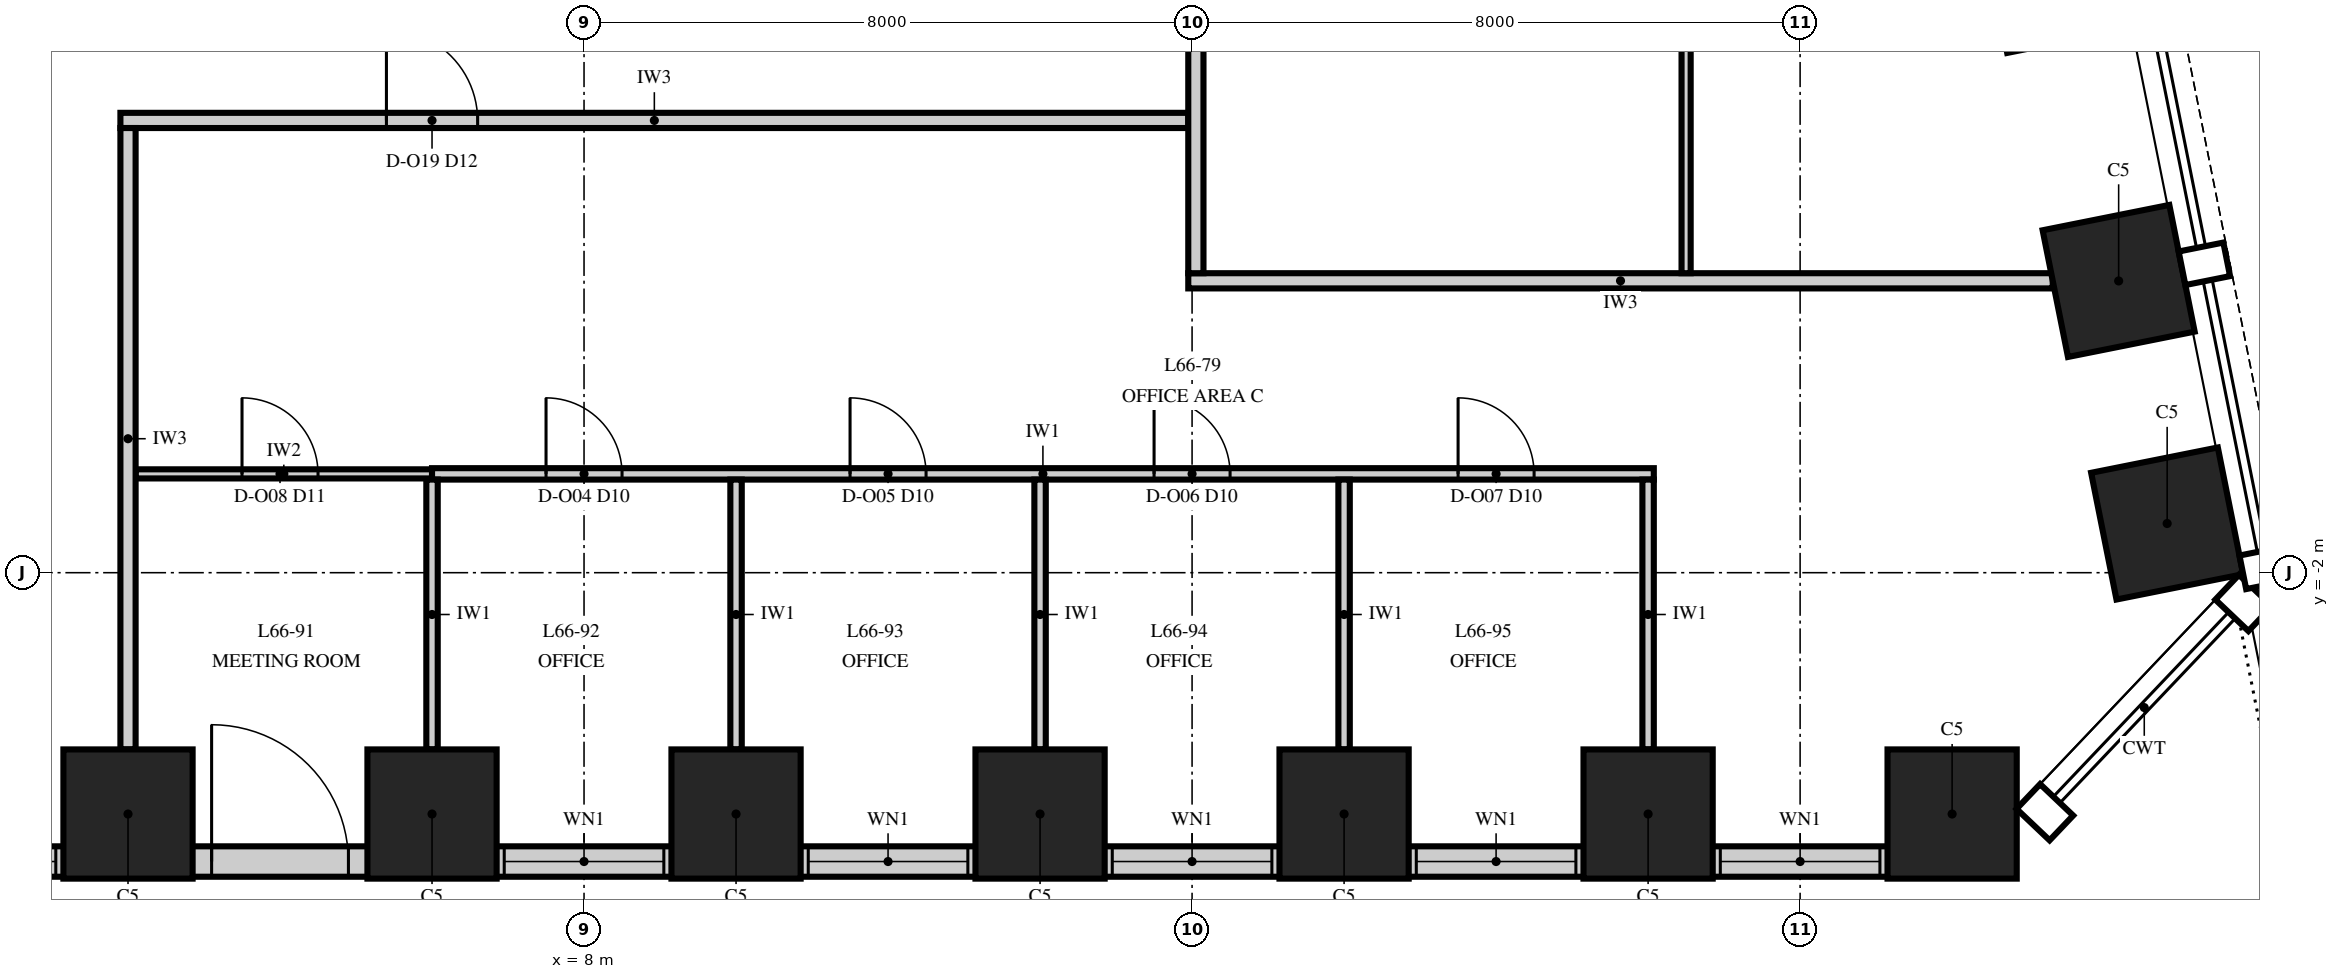
"""IFC4 building model, lengths in metres.
Left out: names, types, materials, properties, quantities, classifications, styles, units other than length and angle.
Written with IfcOpenShell. Run it as: python <this file> out.ifc"""

import sys

from ifc_helpers import new_model, si_unit, direction, frame, frame_2d, origin, origin_2d, place, context, subcontext, project, spatial, rectangle, extrude, element, fill, save


model = new_model("IFC4")
c1 = context("Model", 3, precision=1e-05, world=origin(), true_north=direction((0.0, 1.0)))
c2 = subcontext(c1, "Body", "Model", "MODEL_VIEW")
j1 = project(units=[si_unit("LENGTHUNIT", "METRE"), si_unit("PLANEANGLEUNIT", "RADIAN")], contexts=[c1])
p1 = place(None, origin())
s1 = spatial("IfcSite", under=j1, at=p1, CompositionType="ELEMENT")
p2 = place(p1, origin())
s2 = spatial("IfcBuilding", under=s1, at=p2, CompositionType="ELEMENT")
p3 = place(p2, frame((0.0, 0.0, 284.0)))
s3 = spatial("IfcBuildingStorey", under=s2, at=p3, CompositionType="ELEMENT", Elevation=284.0)
for number, where, z_axis, x_axis in (
    (1, (2.0, -5.175, 0.0), (0.0, 0.0, 1.0), (1.0, 0.0, 0.0)),
    (2, (6.0, -5.175, 0.0), (0.0, 0.0, 1.0), (1.0, 0.0, 0.0)),
    (3, (10.0, -5.175, 0.0), (0.0, 0.0, 1.0), (1.0, 0.0, 0.0)),
    (4, (14.0, -5.175, 0.0), (0.0, 0.0, 1.0), (1.0, 0.0, 0.0)),
    (5, (18.0, -5.175, 0.0), (0.0, 0.0, 1.0), (1.0, 0.0, 0.0)),
    (6, (22.0, -5.175, 0.0), (0.0, 0.0, 1.0), (1.0, 0.0, 0.0)),
    (7, (26.0, -5.175, 0.0), (0.0, 0.0, 1.0), (1.0, 0.0, 0.0)),
    (8, (28.829, -1.353, 0.0), (0.0, 0.0, 1.0), (-0.196, 0.981, 0.0)),
    (9, (28.191, 1.838, 0.0), (0.0, 0.0, 1.0), (-0.196, 0.981, 0.0)),
    (10, (27.391, 5.838, 0.0), (0.0, 0.0, 1.0), (-0.196, 0.981, 0.0)),
):
    element("IfcColumn", number, at=place(p3, frame(where, z_axis=z_axis, x_axis=x_axis)), inside=s3, PredefinedType="COLUMN", context=c2, shape_type="SweptSolid", body=[
        extrude(rectangle(XDim=1.7, YDim=1.7, at=origin_2d()), origin(), (0.0, 0.0, 1.0), 4.0),
    ])
p4 = place(p3, frame((-26.0, -5.8, 0.0), z_axis=(0.0, 0.0, 1.0), x_axis=(1.0, 0.0, 0.0)))
e11 = element("IfcWall", 11, at=p4, inside=s3, PredefinedType="SOLIDWALL", context=c2, shape_type="SweptSolid", body=[
    extrude(rectangle(XDim=52.0, YDim=0.4, at=frame_2d((26.0, 0.0))), origin(), (0.0, 0.0, 1.0), 2.0),
])
p5 = place(p4, frame((0.95, 0.0, 0.8)))
e12 = element("IfcOpeningElement", 12, at=p5, cuts=e11, PredefinedType="OPENING", context=c2, shape_type="SweptSolid", body=[
    extrude(rectangle(XDim=2.1, YDim=1.15, at=frame_2d((1.05, 0.575))), frame((0.0, 0.215, 0.0), z_axis=(0.0, -1.0, 0.0), x_axis=(1.0, 0.0, 0.0)), (0.0, 0.0, 1.0), 0.43),
])
p6 = place(p4, frame((4.95, 0.0, 0.8)))
e13 = element("IfcOpeningElement", 13, at=p6, cuts=e11, PredefinedType="OPENING", context=c2, shape_type="SweptSolid", body=[
    extrude(rectangle(XDim=2.1, YDim=1.15, at=frame_2d((1.05, 0.575))), frame((0.0, 0.215, 0.0), z_axis=(0.0, -1.0, 0.0), x_axis=(1.0, 0.0, 0.0)), (0.0, 0.0, 1.0), 0.43),
])
p7 = place(p4, frame((8.95, 0.0, 0.8)))
e14 = element("IfcOpeningElement", 14, at=p7, cuts=e11, PredefinedType="OPENING", context=c2, shape_type="SweptSolid", body=[
    extrude(rectangle(XDim=2.1, YDim=1.15, at=frame_2d((1.05, 0.575))), frame((0.0, 0.215, 0.0), z_axis=(0.0, -1.0, 0.0), x_axis=(1.0, 0.0, 0.0)), (0.0, 0.0, 1.0), 0.43),
])
p8 = place(p4, frame((12.95, 0.0, 0.8)))
e15 = element("IfcOpeningElement", 15, at=p8, cuts=e11, PredefinedType="OPENING", context=c2, shape_type="SweptSolid", body=[
    extrude(rectangle(XDim=2.1, YDim=1.15, at=frame_2d((1.05, 0.575))), frame((0.0, 0.215, 0.0), z_axis=(0.0, -1.0, 0.0), x_axis=(1.0, 0.0, 0.0)), (0.0, 0.0, 1.0), 0.43),
])
p9 = place(p4, frame((16.95, 0.0, 0.8)))
e16 = element("IfcOpeningElement", 16, at=p9, cuts=e11, PredefinedType="OPENING", context=c2, shape_type="SweptSolid", body=[
    extrude(rectangle(XDim=2.1, YDim=1.15, at=frame_2d((1.05, 0.575))), frame((0.0, 0.215, 0.0), z_axis=(0.0, -1.0, 0.0), x_axis=(1.0, 0.0, 0.0)), (0.0, 0.0, 1.0), 0.43),
])
p10 = place(p4, frame((21.1, 0.0, 0.0)))
e17 = element("IfcOpeningElement", 17, at=p10, cuts=e11, PredefinedType="OPENING", context=c2, shape_type="SweptSolid", body=[
    extrude(rectangle(XDim=1.8, YDim=2.0, at=frame_2d((0.9, 1.0))), frame((0.0, 0.215, 0.0), z_axis=(0.0, -1.0, 0.0), x_axis=(1.0, 0.0, 0.0)), (0.0, 0.0, 1.0), 0.43),
])
p11 = place(p4, frame((24.95, 0.0, 0.8)))
e18 = element("IfcOpeningElement", 18, at=p11, cuts=e11, PredefinedType="OPENING", context=c2, shape_type="SweptSolid", body=[
    extrude(rectangle(XDim=2.1, YDim=1.15, at=frame_2d((1.05, 0.575))), frame((0.0, 0.215, 0.0), z_axis=(0.0, -1.0, 0.0), x_axis=(1.0, 0.0, 0.0)), (0.0, 0.0, 1.0), 0.43),
])
p12 = place(p4, frame((29.1, 0.0, 0.0)))
e19 = element("IfcOpeningElement", 19, at=p12, cuts=e11, PredefinedType="OPENING", context=c2, shape_type="SweptSolid", body=[
    extrude(rectangle(XDim=1.8, YDim=2.0, at=frame_2d((0.9, 1.0))), frame((0.0, 0.215, 0.0), z_axis=(0.0, -1.0, 0.0), x_axis=(1.0, 0.0, 0.0)), (0.0, 0.0, 1.0), 0.43),
])
p13 = place(p4, frame((32.95, 0.0, 0.8)))
e20 = element("IfcOpeningElement", 20, at=p13, cuts=e11, PredefinedType="OPENING", context=c2, shape_type="SweptSolid", body=[
    extrude(rectangle(XDim=2.1, YDim=1.15, at=frame_2d((1.05, 0.575))), frame((0.0, 0.215, 0.0), z_axis=(0.0, -1.0, 0.0), x_axis=(1.0, 0.0, 0.0)), (0.0, 0.0, 1.0), 0.43),
])
p14 = place(p4, frame((36.95, 0.0, 0.8)))
e21 = element("IfcOpeningElement", 21, at=p14, cuts=e11, PredefinedType="OPENING", context=c2, shape_type="SweptSolid", body=[
    extrude(rectangle(XDim=2.1, YDim=1.15, at=frame_2d((1.05, 0.575))), frame((0.0, 0.215, 0.0), z_axis=(0.0, -1.0, 0.0), x_axis=(1.0, 0.0, 0.0)), (0.0, 0.0, 1.0), 0.43),
])
p15 = place(p4, frame((40.95, 0.0, 0.8)))
e22 = element("IfcOpeningElement", 22, at=p15, cuts=e11, PredefinedType="OPENING", context=c2, shape_type="SweptSolid", body=[
    extrude(rectangle(XDim=2.1, YDim=1.15, at=frame_2d((1.05, 0.575))), frame((0.0, 0.215, 0.0), z_axis=(0.0, -1.0, 0.0), x_axis=(1.0, 0.0, 0.0)), (0.0, 0.0, 1.0), 0.43),
])
p16 = place(p4, frame((44.95, 0.0, 0.8)))
e23 = element("IfcOpeningElement", 23, at=p16, cuts=e11, PredefinedType="OPENING", context=c2, shape_type="SweptSolid", body=[
    extrude(rectangle(XDim=2.1, YDim=1.15, at=frame_2d((1.05, 0.575))), frame((0.0, 0.215, 0.0), z_axis=(0.0, -1.0, 0.0), x_axis=(1.0, 0.0, 0.0)), (0.0, 0.0, 1.0), 0.43),
])
p17 = place(p4, frame((48.95, 0.0, 0.8)))
e24 = element("IfcOpeningElement", 24, at=p17, cuts=e11, PredefinedType="OPENING", context=c2, shape_type="SweptSolid", body=[
    extrude(rectangle(XDim=2.1, YDim=1.15, at=frame_2d((1.05, 0.575))), frame((0.0, 0.215, 0.0), z_axis=(0.0, -1.0, 0.0), x_axis=(1.0, 0.0, 0.0)), (0.0, 0.0, 1.0), 0.43),
])
p18 = place(p3, frame((2.1, -0.7, 0.0), z_axis=(0.0, 0.0, 1.0), x_axis=(1.0, 0.0, 0.0)))
e25 = element("IfcWall", 25, at=p18, inside=s3, PredefinedType="PARTITIONING", context=c2, shape_type="SweptSolid", body=[
    extrude(rectangle(XDim=3.9, YDim=0.12, at=frame_2d((1.95, 0.0))), origin(), (0.0, 0.0, 1.0), 3.23),
])
p19 = place(p18, frame((1.4, 0.0, 0.0)))
e26 = element("IfcOpeningElement", 26, at=p19, cuts=e25, PredefinedType="OPENING", context=c2, shape_type="SweptSolid", body=[
    extrude(rectangle(XDim=1.0, YDim=2.4, at=frame_2d((0.5, 1.2))), frame((0.0, 0.075, 0.0), z_axis=(0.0, -1.0, 0.0), x_axis=(1.0, 0.0, 0.0)), (0.0, 0.0, 1.0), 0.15),
])
p20 = place(p3, frame((6.0, -0.7, 0.0), z_axis=(0.0, 0.0, 1.0), x_axis=(1.0, 0.0, 0.0)))
e27 = element("IfcWall", 27, at=p20, inside=s3, PredefinedType="PARTITIONING", context=c2, shape_type="SweptSolid", body=[
    extrude(rectangle(XDim=16.075, YDim=0.15, at=frame_2d((8.038, 0.0))), origin(), (0.0, 0.0, 1.0), 3.23),
])
p21 = place(p20, frame((1.5, 0.0, 0.0)))
e28 = element("IfcOpeningElement", 28, at=p21, cuts=e27, PredefinedType="OPENING", context=c2, shape_type="SweptSolid", body=[
    extrude(rectangle(XDim=1.0, YDim=2.3, at=frame_2d((0.5, 1.15))), frame((0.0, 0.09, 0.0), z_axis=(0.0, -1.0, 0.0), x_axis=(1.0, 0.0, 0.0)), (0.0, 0.0, 1.0), 0.18),
])
p22 = place(p20, frame((5.5, 0.0, 0.0)))
e29 = element("IfcOpeningElement", 29, at=p22, cuts=e27, PredefinedType="OPENING", context=c2, shape_type="SweptSolid", body=[
    extrude(rectangle(XDim=1.0, YDim=2.3, at=frame_2d((0.5, 1.15))), frame((0.0, 0.09, 0.0), z_axis=(0.0, -1.0, 0.0), x_axis=(1.0, 0.0, 0.0)), (0.0, 0.0, 1.0), 0.18),
])
p23 = place(p20, frame((9.5, 0.0, 0.0)))
e30 = element("IfcOpeningElement", 30, at=p23, cuts=e27, PredefinedType="OPENING", context=c2, shape_type="SweptSolid", body=[
    extrude(rectangle(XDim=1.0, YDim=2.3, at=frame_2d((0.5, 1.15))), frame((0.0, 0.09, 0.0), z_axis=(0.0, -1.0, 0.0), x_axis=(1.0, 0.0, 0.0)), (0.0, 0.0, 1.0), 0.18),
])
p24 = place(p20, frame((13.5, 0.0, 0.0)))
e31 = element("IfcOpeningElement", 31, at=p24, cuts=e27, PredefinedType="OPENING", context=c2, shape_type="SweptSolid", body=[
    extrude(rectangle(XDim=1.0, YDim=2.3, at=frame_2d((0.5, 1.15))), frame((0.0, 0.09, 0.0), z_axis=(0.0, -1.0, 0.0), x_axis=(1.0, 0.0, 0.0)), (0.0, 0.0, 1.0), 0.18),
])
p25 = place(p3, frame((15.95, 1.84, 0.0), z_axis=(0.0, 0.0, 1.0), x_axis=(1.0, 0.0, 0.0)))
e32 = element("IfcWall", 32, at=p25, inside=s3, PredefinedType="PARTITIONING", context=c2, shape_type="SweptSolid", body=[
    extrude(rectangle(XDim=11.374, YDim=0.2, at=frame_2d((5.687, 0.0))), origin(), (0.0, 0.0, 1.0), 3.23),
])
p26 = place(p3, frame((1.9, 3.95, 0.0), z_axis=(0.0, 0.0, 1.0), x_axis=(1.0, 0.0, 0.0)))
e33 = element("IfcWall", 33, at=p26, inside=s3, PredefinedType="PARTITIONING", context=c2, shape_type="SweptSolid", body=[
    extrude(rectangle(XDim=14.05, YDim=0.2, at=frame_2d((7.025, 0.0))), origin(), (0.0, 0.0, 1.0), 3.23),
])
p27 = place(p26, frame((3.5, 0.0, 0.0)))
e34 = element("IfcOpeningElement", 34, at=p27, cuts=e33, PredefinedType="OPENING", context=c2, shape_type="SweptSolid", body=[
    extrude(rectangle(XDim=1.2, YDim=2.4, at=frame_2d((0.6, 1.2))), frame((0.0, 0.115, 0.0), z_axis=(0.0, -1.0, 0.0), x_axis=(1.0, 0.0, 0.0)), (0.0, 0.0, 1.0), 0.23),
])
p28 = place(p3, frame((2.0, -4.325, 0.0), z_axis=(0.0, 0.0, 1.0), x_axis=(0.0, 1.0, 0.0)))
e35 = element("IfcWall", 35, at=p28, inside=s3, PredefinedType="PARTITIONING", context=c2, shape_type="SweptSolid", body=[
    extrude(rectangle(XDim=8.175, YDim=0.2, at=frame_2d((4.087, 0.0))), origin(), (0.0, 0.0, 1.0), 3.23),
])
for number, where, z_axis, x_axis in (
    (36, (6.0, -4.325, 0.0), (0.0, 0.0, 1.0), (0.0, 1.0, 0.0)),
    (37, (10.0, -4.325, 0.0), (0.0, 0.0, 1.0), (0.0, 1.0, 0.0)),
    (38, (14.0, -4.325, 0.0), (0.0, 0.0, 1.0), (0.0, 1.0, 0.0)),
):
    element("IfcWall", number, at=place(p3, frame(where, z_axis=z_axis, x_axis=x_axis)), inside=s3, PredefinedType="PARTITIONING", context=c2, shape_type="SweptSolid", body=[
        extrude(rectangle(XDim=3.55, YDim=0.15, at=frame_2d((1.775, 0.0))), origin(), (0.0, 0.0, 1.0), 3.23),
    ])
p29 = place(p3, frame((16.05, 1.94, 0.0), z_axis=(0.0, 0.0, 1.0), x_axis=(0.0, 1.0, 0.0)))
e39 = element("IfcWall", 39, at=p29, inside=s3, PredefinedType="PARTITIONING", context=c2, shape_type="SweptSolid", body=[
    extrude(rectangle(XDim=24.01, YDim=0.2, at=frame_2d((12.005, 0.0))), origin(), (0.0, 0.0, 1.0), 2.842),
])
p30 = place(p29, frame((8.46, 0.0, 0.0)))
e40 = element("IfcOpeningElement", 40, at=p30, cuts=e39, PredefinedType="OPENING", context=c2, shape_type="SweptSolid", body=[
    extrude(rectangle(XDim=1.2, YDim=2.4, at=frame_2d((0.6, 1.2))), frame((0.0, 0.115, 0.0), z_axis=(0.0, -1.0, 0.0), x_axis=(1.0, 0.0, 0.0)), (0.0, 0.0, 1.0), 0.23),
])
p31 = place(p29, frame((22.46, 0.0, 0.0)))
e41 = element("IfcOpeningElement", 41, at=p31, cuts=e39, PredefinedType="OPENING", context=c2, shape_type="SweptSolid", body=[
    extrude(rectangle(XDim=1.2, YDim=2.4, at=frame_2d((0.6, 1.2))), frame((0.0, 0.115, 0.0), z_axis=(0.0, -1.0, 0.0), x_axis=(1.0, 0.0, 0.0)), (0.0, 0.0, 1.0), 0.23),
])
for number, where, z_axis, x_axis in (
    (42, (18.0, -4.325, 0.0), (0.0, 0.0, 1.0), (0.0, 1.0, 0.0)),
    (43, (22.0, -4.325, 0.0), (0.0, 0.0, 1.0), (0.0, 1.0, 0.0)),
):
    element("IfcWall", number, at=place(p3, frame(where, z_axis=z_axis, x_axis=x_axis)), inside=s3, PredefinedType="PARTITIONING", context=c2, shape_type="SweptSolid", body=[
        extrude(rectangle(XDim=3.55, YDim=0.15, at=frame_2d((1.775, 0.0))), origin(), (0.0, 0.0, 1.0), 3.23),
    ])
p32 = place(p3, frame((22.5, 1.94, 0.0), z_axis=(0.0, 0.0, 1.0), x_axis=(0.0, 1.0, 0.0)))
e44 = element("IfcWall", 44, at=p32, inside=s3, PredefinedType="PARTITIONING", context=c2, shape_type="SweptSolid", body=[
    extrude(rectangle(XDim=7.825, YDim=0.12, at=frame_2d((3.913, 0.0))), origin(), (0.0, 0.0, 1.0), 2.842),
])
p33 = place(p32, frame((3.4, 0.0, 0.0)))
e45 = element("IfcOpeningElement", 45, at=p33, cuts=e44, PredefinedType="OPENING", context=c2, shape_type="SweptSolid", body=[
    extrude(rectangle(XDim=1.0, YDim=2.4, at=frame_2d((0.5, 1.2))), frame((0.0, 0.075, 0.0), z_axis=(0.0, -1.0, 0.0), x_axis=(1.0, 0.0, 0.0)), (0.0, 0.0, 1.0), 0.15),
])
p34 = place(p11, origin())
e46 = element("IfcWindow", 46, at=p34, inside=s3, PartitioningType="SINGLE_PANEL", PredefinedType="WINDOW", context=c2, shape_type="SweptSolid", body=[
    extrude(rectangle(XDim=2.1, YDim=1.15, at=frame_2d((1.05, 0.575))), frame((0.0, 0.03, 0.0), z_axis=(0.0, -1.0, 0.0), x_axis=(1.0, 0.0, 0.0)), (0.0, 0.0, 1.0), 0.06),
])
fill(e18, e46)
p35 = place(p12, origin())
e47 = element("IfcDoor", 47, at=p35, inside=s3, OperationType="DOUBLE_DOOR_SINGLE_SWING", PredefinedType="DOOR", context=c2, shape_type="SweptSolid", body=[
    extrude(rectangle(XDim=1.8, YDim=2.0, at=frame_2d((0.9, 1.0))), frame((0.0, 0.2, 0.0), z_axis=(0.0, -1.0, 0.0), x_axis=(1.0, 0.0, 0.0)), (0.0, 0.0, 1.0), 0.399),
])
fill(e19, e47)
p36 = place(p13, origin())
e48 = element("IfcWindow", 48, at=p36, inside=s3, PartitioningType="SINGLE_PANEL", PredefinedType="WINDOW", context=c2, shape_type="SweptSolid", body=[
    extrude(rectangle(XDim=2.1, YDim=1.15, at=frame_2d((1.05, 0.575))), frame((0.0, 0.03, 0.0), z_axis=(0.0, -1.0, 0.0), x_axis=(1.0, 0.0, 0.0)), (0.0, 0.0, 1.0), 0.06),
])
fill(e20, e48)
p37 = place(p14, origin())
e49 = element("IfcWindow", 49, at=p37, inside=s3, PartitioningType="SINGLE_PANEL", PredefinedType="WINDOW", context=c2, shape_type="SweptSolid", body=[
    extrude(rectangle(XDim=2.1, YDim=1.15, at=frame_2d((1.05, 0.575))), frame((0.0, 0.03, 0.0), z_axis=(0.0, -1.0, 0.0), x_axis=(1.0, 0.0, 0.0)), (0.0, 0.0, 1.0), 0.06),
])
fill(e21, e49)
p38 = place(p15, origin())
e50 = element("IfcWindow", 50, at=p38, inside=s3, PartitioningType="SINGLE_PANEL", PredefinedType="WINDOW", context=c2, shape_type="SweptSolid", body=[
    extrude(rectangle(XDim=2.1, YDim=1.15, at=frame_2d((1.05, 0.575))), frame((0.0, 0.03, 0.0), z_axis=(0.0, -1.0, 0.0), x_axis=(1.0, 0.0, 0.0)), (0.0, 0.0, 1.0), 0.06),
])
fill(e22, e50)
p39 = place(p16, origin())
e51 = element("IfcWindow", 51, at=p39, inside=s3, PartitioningType="SINGLE_PANEL", PredefinedType="WINDOW", context=c2, shape_type="SweptSolid", body=[
    extrude(rectangle(XDim=2.1, YDim=1.15, at=frame_2d((1.05, 0.575))), frame((0.0, 0.03, 0.0), z_axis=(0.0, -1.0, 0.0), x_axis=(1.0, 0.0, 0.0)), (0.0, 0.0, 1.0), 0.06),
])
fill(e23, e51)
p40 = place(p17, origin())
e52 = element("IfcWindow", 52, at=p40, inside=s3, PartitioningType="SINGLE_PANEL", PredefinedType="WINDOW", context=c2, shape_type="SweptSolid", body=[
    extrude(rectangle(XDim=2.1, YDim=1.15, at=frame_2d((1.05, 0.575))), frame((0.0, 0.03, 0.0), z_axis=(0.0, -1.0, 0.0), x_axis=(1.0, 0.0, 0.0)), (0.0, 0.0, 1.0), 0.06),
])
fill(e24, e52)
p41 = place(p21, origin())
e53 = element("IfcDoor", 53, at=p41, inside=s3, OperationType="SINGLE_SWING_LEFT", PredefinedType="DOOR", context=c2, shape_type="SweptSolid", body=[
    extrude(rectangle(XDim=1.0, YDim=2.3, at=frame_2d((0.5, 1.15))), frame((0.0, 0.075, 0.0), z_axis=(0.0, -1.0, 0.0), x_axis=(1.0, 0.0, 0.0)), (0.0, 0.0, 1.0), 0.149),
])
fill(e28, e53)
p42 = place(p22, origin())
e54 = element("IfcDoor", 54, at=p42, inside=s3, OperationType="SINGLE_SWING_LEFT", PredefinedType="DOOR", context=c2, shape_type="SweptSolid", body=[
    extrude(rectangle(XDim=1.0, YDim=2.3, at=frame_2d((0.5, 1.15))), frame((0.0, 0.075, 0.0), z_axis=(0.0, -1.0, 0.0), x_axis=(1.0, 0.0, 0.0)), (0.0, 0.0, 1.0), 0.149),
])
fill(e29, e54)
p43 = place(p23, origin())
e55 = element("IfcDoor", 55, at=p43, inside=s3, OperationType="SINGLE_SWING_LEFT", PredefinedType="DOOR", context=c2, shape_type="SweptSolid", body=[
    extrude(rectangle(XDim=1.0, YDim=2.3, at=frame_2d((0.5, 1.15))), frame((0.0, 0.075, 0.0), z_axis=(0.0, -1.0, 0.0), x_axis=(1.0, 0.0, 0.0)), (0.0, 0.0, 1.0), 0.149),
])
fill(e30, e55)
p44 = place(p24, origin())
e56 = element("IfcDoor", 56, at=p44, inside=s3, OperationType="SINGLE_SWING_LEFT", PredefinedType="DOOR", context=c2, shape_type="SweptSolid", body=[
    extrude(rectangle(XDim=1.0, YDim=2.3, at=frame_2d((0.5, 1.15))), frame((0.0, 0.075, 0.0), z_axis=(0.0, -1.0, 0.0), x_axis=(1.0, 0.0, 0.0)), (0.0, 0.0, 1.0), 0.149),
])
fill(e31, e56)
p45 = place(p19, origin())
e57 = element("IfcDoor", 57, at=p45, inside=s3, OperationType="SINGLE_SWING_RIGHT", PredefinedType="DOOR", context=c2, shape_type="SweptSolid", body=[
    extrude(rectangle(XDim=1.0, YDim=2.4, at=frame_2d((0.5, 1.2))), frame((0.0, 0.06, 0.0), z_axis=(0.0, -1.0, 0.0), x_axis=(1.0, 0.0, 0.0)), (0.0, 0.0, 1.0), 0.12),
])
fill(e26, e57)
p46 = place(p27, origin())
e58 = element("IfcDoor", 58, at=p46, inside=s3, OperationType="SINGLE_SWING_LEFT", PredefinedType="DOOR", context=c2, shape_type="SweptSolid", body=[
    extrude(rectangle(XDim=1.2, YDim=2.4, at=frame_2d((0.6, 1.2))), frame((0.0, 0.1, 0.0), z_axis=(0.0, -1.0, 0.0), x_axis=(1.0, 0.0, 0.0)), (0.0, 0.0, 1.0), 0.199),
])
fill(e34, e58)
save(model, sys.argv[1])
